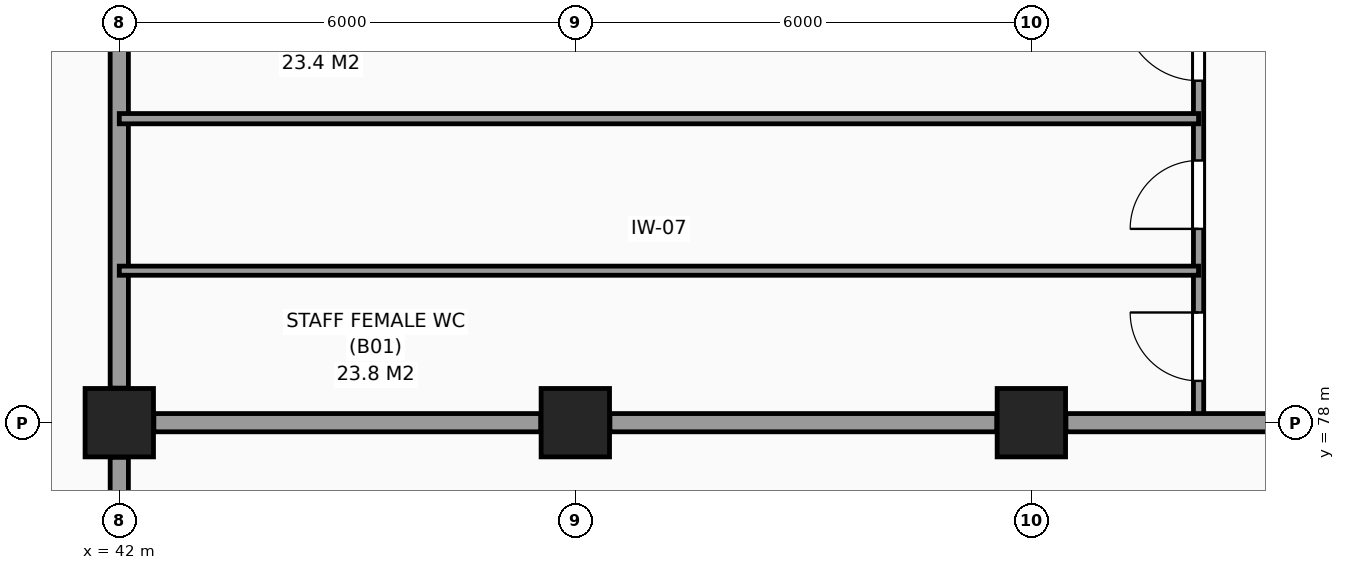
"""IFC4 building model, lengths in metres.
Left out: names, types, materials, properties, quantities, classifications, styles, units other than length and angle.
Written with IfcOpenShell. Run it as: python <this file> out.ifc"""

import sys

from ifc_helpers import new_model, si_unit, direction, frame, frame_2d, origin, origin_2d, place, context, subcontext, project, spatial, rectangle, extrude, element, fill, save


model = new_model("IFC4")
c1 = context("Model", 3, precision=1e-05, world=origin(), true_north=direction((0.0, 1.0)))
c2 = subcontext(c1, "Body", "Model", "MODEL_VIEW")
j1 = project(units=[si_unit("LENGTHUNIT", "METRE"), si_unit("PLANEANGLEUNIT", "RADIAN")], contexts=[c1])
p1 = place(None, origin())
s1 = spatial("IfcSite", under=j1, at=p1, CompositionType="ELEMENT")
p2 = place(p1, origin())
s2 = spatial("IfcBuilding", under=s1, at=p2, CompositionType="ELEMENT")
p3 = place(p2, frame((0.0, 0.0, -4.8)))
s3 = spatial("IfcBuildingStorey", under=s2, at=p3, CompositionType="ELEMENT", Elevation=-4.8)
for number, where, z_axis, x_axis in (
    (1, (42.0, 78.0, 0.0), (0.0, 0.0, 1.0), (1.0, 0.0, 0.0)),
    (2, (48.0, 78.0, 0.0), (0.0, 0.0, 1.0), (1.0, 0.0, 0.0)),
    (3, (54.0, 78.0, 0.0), (0.0, 0.0, 1.0), (1.0, 0.0, 0.0)),
):
    element("IfcColumn", number, at=place(p3, frame(where, z_axis=z_axis, x_axis=x_axis)), inside=s3, PredefinedType="COLUMN", context=c2, shape_type="SweptSolid", body=[
        extrude(rectangle(XDim=0.9, YDim=0.9, at=origin_2d()), origin(), (0.0, 0.0, 1.0), 4.8),
    ])
p4 = place(p3, frame((42.0, 72.455, 0.0), z_axis=(0.0, 0.0, 1.0), x_axis=(0.0, 1.0, 0.0)))
e4 = element("IfcWall", 4, at=p4, inside=s3, PredefinedType="PARTITIONING", context=c2, shape_type="SweptSolid", body=[
    extrude(rectangle(XDim=5.09, YDim=0.24, at=frame_2d((2.545, 0.0))), origin(), (0.0, 0.0, 1.0), 3.95),
])
p5 = place(p3, frame((42.0, 78.455, 0.0), z_axis=(0.0, 0.0, 1.0), x_axis=(0.0, 1.0, 0.0)))
e5 = element("IfcWall", 5, at=p5, inside=s3, PredefinedType="PARTITIONING", context=c2, shape_type="SweptSolid", body=[
    extrude(rectangle(XDim=5.04, YDim=0.24, at=frame_2d((2.52, 0.0))), origin(), (0.0, 0.0, 1.0), 4.0),
])
p6 = place(p3, frame((56.2, 78.0, 0.0), z_axis=(0.0, 0.0, 1.0), x_axis=(0.0, 1.0, 0.0)))
e6 = element("IfcWall", 6, at=p6, inside=s3, PredefinedType="PARTITIONING", context=c2, shape_type="SweptSolid", body=[
    extrude(rectangle(XDim=5.82, YDim=0.135, at=frame_2d((2.91, 0.0))), origin(), (0.0, 0.0, 1.0), 4.5),
])
p7 = place(p6, frame((0.55, 0.0, 0.0)))
e7 = element("IfcOpeningElement", 7, at=p7, cuts=e6, PredefinedType="OPENING", context=c2, shape_type="SweptSolid", body=[
    extrude(rectangle(XDim=0.9, YDim=2.1, at=frame_2d((0.45, 1.05))), frame((0.0, 0.078, 0.0), z_axis=(0.0, -1.0, 0.0), x_axis=(1.0, 0.0, 0.0)), (0.0, 0.0, 1.0), 0.155),
])
p8 = place(p6, frame((2.55, 0.0, 0.0)))
e8 = element("IfcOpeningElement", 8, at=p8, cuts=e6, PredefinedType="OPENING", context=c2, shape_type="SweptSolid", body=[
    extrude(rectangle(XDim=0.9, YDim=2.1, at=frame_2d((0.45, 1.05))), frame((0.0, 0.078, 0.0), z_axis=(0.0, -1.0, 0.0), x_axis=(1.0, 0.0, 0.0)), (0.0, 0.0, 1.0), 0.155),
])
p9 = place(p6, frame((4.5, 0.0, 0.0)))
e9 = element("IfcOpeningElement", 9, at=p9, cuts=e6, PredefinedType="OPENING", context=c2, shape_type="SweptSolid", body=[
    extrude(rectangle(XDim=1.0, YDim=2.15, at=frame_2d((0.5, 1.075))), frame((0.0, 0.078, 0.0), z_axis=(0.0, -1.0, 0.0), x_axis=(1.0, 0.0, 0.0)), (0.0, 0.0, 1.0), 0.155),
])
p10 = place(p3, frame((42.455, 78.0, 0.0), z_axis=(0.0, 0.0, 1.0), x_axis=(1.0, 0.0, 0.0)))
e10 = element("IfcWall", 10, at=p10, inside=s3, PredefinedType="PARTITIONING", context=c2, shape_type="SweptSolid", body=[
    extrude(rectangle(XDim=5.09, YDim=0.24, at=frame_2d((2.545, 0.0))), origin(), (0.0, 0.0, 1.0), 3.9),
])
p11 = place(p3, frame((48.455, 78.0, 0.0), z_axis=(0.0, 0.0, 1.0), x_axis=(1.0, 0.0, 0.0)))
e11 = element("IfcWall", 11, at=p11, inside=s3, PredefinedType="PARTITIONING", context=c2, shape_type="SweptSolid", body=[
    extrude(rectangle(XDim=5.09, YDim=0.24, at=frame_2d((2.545, 0.0))), origin(), (0.0, 0.0, 1.0), 4.05),
])
p12 = place(p3, frame((54.455, 78.0, 0.0), z_axis=(0.0, 0.0, 1.0), x_axis=(1.0, 0.0, 0.0)))
e12 = element("IfcWall", 12, at=p12, inside=s3, PredefinedType="PARTITIONING", context=c2, shape_type="SweptSolid", body=[
    extrude(rectangle(XDim=5.09, YDim=0.24, at=frame_2d((2.545, 0.0))), origin(), (0.0, 0.0, 1.0), 4.21),
])
p13 = place(p3, frame((42.0, 80.0, 0.0), z_axis=(0.0, 0.0, 1.0), x_axis=(1.0, 0.0, 0.0)))
e13 = element("IfcWall", 13, at=p13, inside=s3, PredefinedType="PARTITIONING", context=c2, shape_type="SweptSolid", body=[
    extrude(rectangle(XDim=14.2, YDim=0.12, at=frame_2d((7.1, 0.0))), origin(), (0.0, 0.0, 1.0), 4.5),
])
p14 = place(p3, frame((42.0, 82.0, 0.0), z_axis=(0.0, 0.0, 1.0), x_axis=(1.0, 0.0, 0.0)))
e14 = element("IfcWall", 14, at=p14, inside=s3, PredefinedType="PARTITIONING", context=c2, shape_type="SweptSolid", body=[
    extrude(rectangle(XDim=14.2, YDim=0.135, at=frame_2d((7.1, 0.0))), origin(), (0.0, 0.0, 1.0), 4.5),
])
p15 = place(p7, origin())
e15 = element("IfcDoor", 15, at=p15, inside=s3, OperationType="SINGLE_SWING_RIGHT", PredefinedType="DOOR", context=c2, shape_type="SweptSolid", body=[
    extrude(rectangle(XDim=0.9, YDim=2.1, at=frame_2d((0.45, 1.05))), frame((0.0, 0.025, 0.0), z_axis=(0.0, -1.0, 0.0), x_axis=(1.0, 0.0, 0.0)), (0.0, 0.0, 1.0), 0.05),
])
fill(e7, e15)
p16 = place(p8, origin())
e16 = element("IfcDoor", 16, at=p16, inside=s3, OperationType="SINGLE_SWING_LEFT", PredefinedType="DOOR", context=c2, shape_type="SweptSolid", body=[
    extrude(rectangle(XDim=0.9, YDim=2.1, at=frame_2d((0.45, 1.05))), frame((0.0, 0.025, 0.0), z_axis=(0.0, -1.0, 0.0), x_axis=(1.0, 0.0, 0.0)), (0.0, 0.0, 1.0), 0.05),
])
fill(e8, e16)
p17 = place(p9, origin())
e17 = element("IfcDoor", 17, at=p17, inside=s3, OperationType="SINGLE_SWING_RIGHT", PredefinedType="DOOR", context=c2, shape_type="SweptSolid", body=[
    extrude(rectangle(XDim=1.0, YDim=2.15, at=frame_2d((0.5, 1.075))), frame((0.0, 0.025, 0.0), z_axis=(0.0, -1.0, 0.0), x_axis=(1.0, 0.0, 0.0)), (0.0, 0.0, 1.0), 0.05),
])
fill(e9, e17)
save(model, sys.argv[1])
